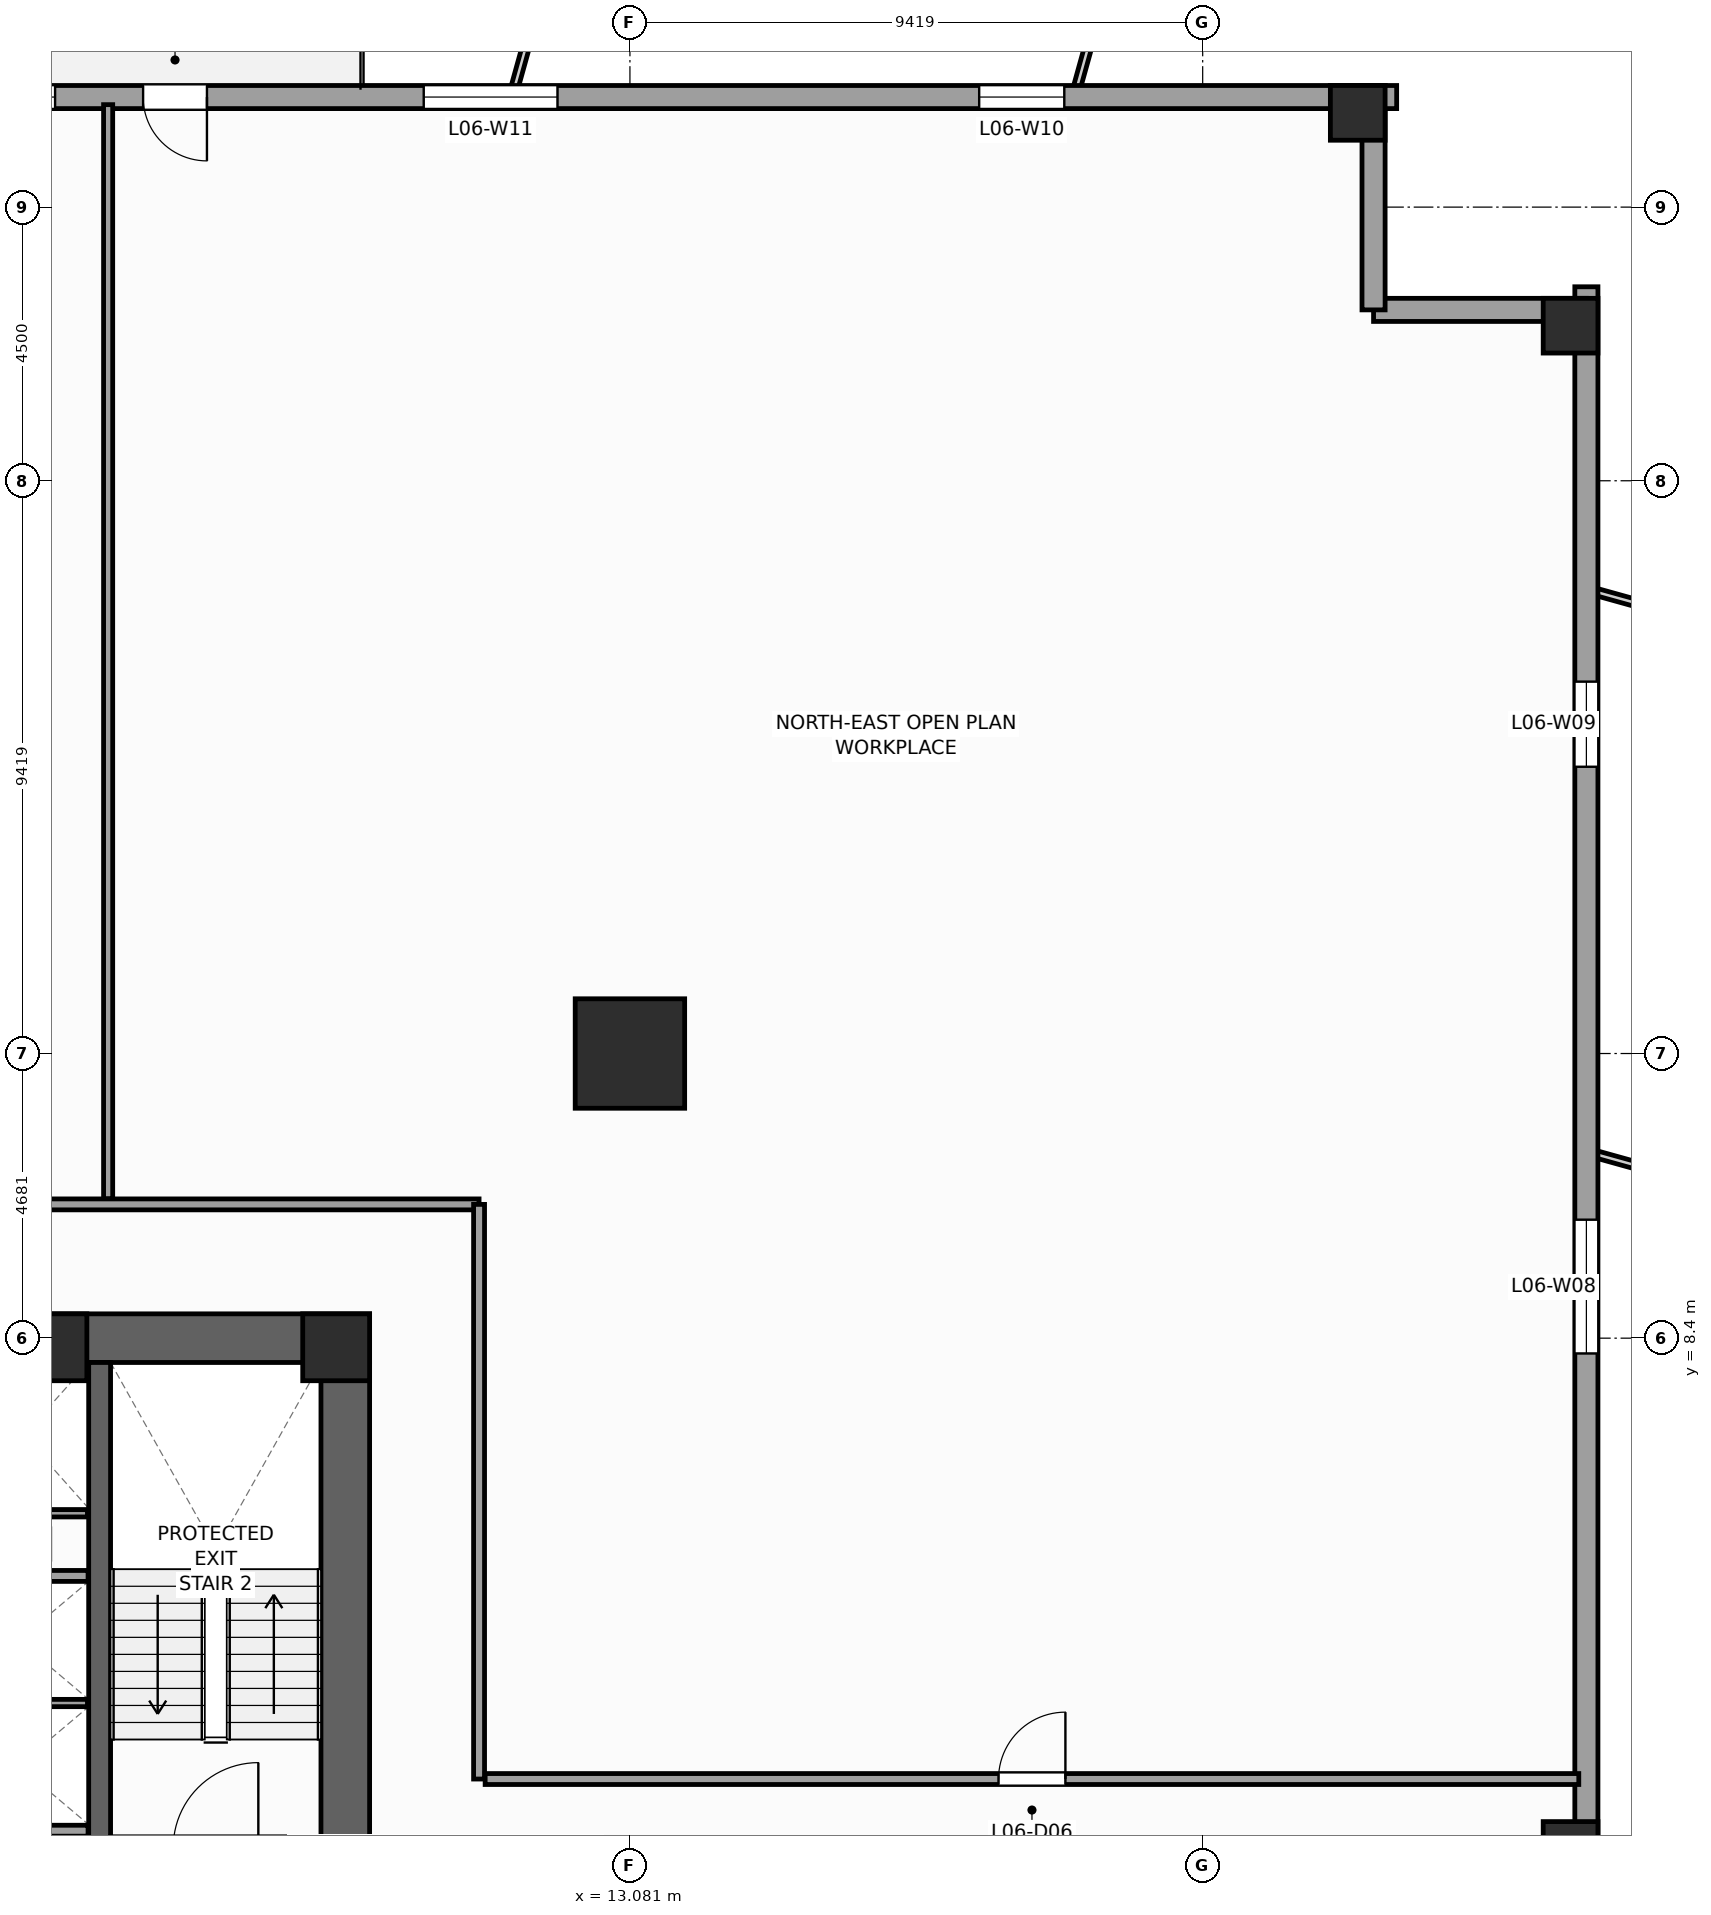
"""IFC4 building model, lengths in metres.
Left out: names, types, materials, properties, quantities, classifications, styles, units other than length and angle.
Written with IfcOpenShell. Run it as: python <this file> out.ifc"""

import sys

from ifc_helpers import new_model, si_unit, direction, frame, frame_2d, origin, origin_2d, place, context, subcontext, project, spatial, rectangle, extrude, source, transform, mapped, element, fill, save


model = new_model("IFC4")
c1 = context("Model", 3, precision=1e-05, world=origin(), true_north=direction((0.0, 1.0)))
c2 = subcontext(c1, "Body", "Model", "MODEL_VIEW")
j1 = project(units=[si_unit("LENGTHUNIT", "METRE"), si_unit("PLANEANGLEUNIT", "RADIAN")], contexts=[c1])
p1 = place(None, origin())
s1 = spatial("IfcSite", under=j1, at=p1, CompositionType="ELEMENT")
p2 = place(p1, origin())
s2 = spatial("IfcBuilding", under=s1, at=p2, CompositionType="ELEMENT")
p3 = place(p2, frame((0.0, 0.0, 30.0)))
s3 = spatial("IfcBuildingStorey", under=s2, at=p3, CompositionType="ELEMENT", Elevation=30.0)
p4 = place(p3, frame((-8.8, 8.4, 0.0), z_axis=(0.0, 0.0, 1.0), x_axis=(1.0, 0.0, 0.0)))
e1 = element("IfcWall", 1, at=p4, inside=s3, PredefinedType="SHEAR", context=c2, shape_type="SweptSolid", body=[
    extrude(rectangle(XDim=17.6, YDim=0.8, at=frame_2d((8.8, 0.0))), origin(), (0.0, 0.0, 1.0), 4.0),
])
p5 = place(p3, frame((8.4, -8.0, 0.0), z_axis=(0.0, 0.0, 1.0), x_axis=(0.0, 1.0, 0.0)))
e2 = element("IfcWall", 2, at=p5, inside=s3, PredefinedType="SHEAR", context=c2, shape_type="SweptSolid", body=[
    extrude(rectangle(XDim=16.0, YDim=0.8, at=frame_2d((8.0, 0.0))), origin(), (0.0, 0.0, 1.0), 4.0),
])
p6 = place(p5, frame((4.69, 0.0, 0.0)))
e3 = element("IfcOpeningElement", 3, at=p6, cuts=e2, PredefinedType="OPENING", context=c2, shape_type="SweptSolid", body=[
    extrude(rectangle(XDim=1.3, YDim=2.2, at=frame_2d((0.65, 1.1))), frame((0.0, 0.41, 0.0), z_axis=(0.0, -1.0, 0.0), x_axis=(1.0, 0.0, 0.0)), (0.0, 0.0, 1.0), 0.82),
])
p7 = place(p3, frame((4.36, -8.0, 0.0), z_axis=(0.0, 0.0, 1.0), x_axis=(0.0, 1.0, 0.0)))
e4 = element("IfcWall", 4, at=p7, inside=s3, PredefinedType="SHEAR", context=c2, shape_type="SweptSolid", body=[
    extrude(rectangle(XDim=16.0, YDim=0.36, at=frame_2d((8.0, 0.0))), origin(), (0.0, 0.0, 1.0), 4.0),
])
m1 = source(origin(), c2, "Body", "SweptSolid", [
    extrude(rectangle(XDim=1.1, YDim=1.1, at=origin_2d()), origin(), (0.0, 0.0, 1.0), 4.0),
])
for number, where, z_axis, x_axis in (
    (5, (8.25, 8.25, 0.0), (0.0, 0.0, 1.0), (1.0, 0.0, 0.0)),
    (6, (3.6, 8.25, 0.0), (0.0, 0.0, 1.0), (1.0, 0.0, 0.0)),
):
    element("IfcColumn", number, at=place(p3, frame(where, z_axis=z_axis, x_axis=x_axis)), inside=s3, PredefinedType="PILASTER", context=c2, shape_type="MappedRepresentation", body=[
        mapped(m1, transform((0.0, 0.0, 0.0), scale=1.0)),
    ])
m2 = source(origin(), c2, "Body", "SweptSolid", [
    extrude(rectangle(XDim=1.8, YDim=1.8, at=origin_2d()), origin(), (0.0, 0.0, 1.0), 4.0),
])
p8 = place(p3, frame((13.081, 13.081, 0.0), z_axis=(0.0, 0.0, 1.0), x_axis=(1.0, 0.0, 0.0)))
e7 = element("IfcColumn", 7, at=p8, inside=s3, PredefinedType="COLUMN", context=c2, shape_type="MappedRepresentation", body=[
    mapped(m2, transform((0.0, 0.0, 0.0), scale=1.0)),
])
m3 = source(origin(), c2, "Body", "SweptSolid", [
    extrude(rectangle(XDim=0.9, YDim=0.9, at=origin_2d()), origin(), (0.0, 0.0, 1.0), 4.0),
])
for number, where, z_axis, x_axis in (
    (8, (28.55, 0.0, 0.0), (0.0, 0.0, 1.0), (1.0, 0.0, 0.0)),
    (9, (28.55, 25.05, 0.0), (0.0, 0.0, 1.0), (1.0, 0.0, 0.0)),
    (10, (25.05, 28.55, 0.0), (0.0, 0.0, 1.0), (1.0, 0.0, 0.0)),
):
    element("IfcColumn", number, at=place(p3, frame(where, z_axis=z_axis, x_axis=x_axis)), inside=s3, PredefinedType="COLUMN", context=c2, shape_type="MappedRepresentation", body=[
        mapped(m3, transform((0.0, 0.0, 0.0), scale=1.0)),
    ])
p9 = place(p3, frame((28.81, -25.69, 0.0), z_axis=(0.0, 0.0, 1.0), x_axis=(0.0, 1.0, 0.0)))
e11 = element("IfcWall", 11, at=p9, inside=s3, PredefinedType="STANDARD", context=c2, shape_type="SweptSolid", body=[
    extrude(rectangle(XDim=51.38, YDim=0.38, at=frame_2d((25.69, 0.0))), origin(), (0.0, 0.0, 1.0), 3.12),
])
p10 = place(p9, frame((5.466, 0.0, 0.49)))
e12 = element("IfcOpeningElement", 12, at=p10, cuts=e11, PredefinedType="OPENING", context=c2, shape_type="SweptSolid", body=[
    extrude(rectangle(XDim=1.4, YDim=2.4, at=frame_2d((0.7, 1.2))), frame((0.0, 0.2, 0.0), z_axis=(0.0, -1.0, 0.0), x_axis=(1.0, 0.0, 0.0)), (0.0, 0.0, 1.0), 0.4),
])
p11 = place(p9, frame((13.8, 0.0, 0.49)))
e13 = element("IfcOpeningElement", 13, at=p11, cuts=e11, PredefinedType="OPENING", context=c2, shape_type="SweptSolid", body=[
    extrude(rectangle(XDim=2.2, YDim=2.4, at=frame_2d((1.1, 1.2))), frame((0.0, 0.2, 0.0), z_axis=(0.0, -1.0, 0.0), x_axis=(1.0, 0.0, 0.0)), (0.0, 0.0, 1.0), 0.4),
])
p12 = place(p9, frame((21.312, 0.0, 0.49)))
e14 = element("IfcOpeningElement", 14, at=p12, cuts=e11, PredefinedType="OPENING", context=c2, shape_type="SweptSolid", body=[
    extrude(rectangle(XDim=2.2, YDim=2.4, at=frame_2d((1.1, 1.2))), frame((0.0, 0.2, 0.0), z_axis=(0.0, -1.0, 0.0), x_axis=(1.0, 0.0, 0.0)), (0.0, 0.0, 1.0), 0.4),
])
p13 = place(p9, frame((33.838, 0.0, 0.49)))
e15 = element("IfcOpeningElement", 15, at=p13, cuts=e11, PredefinedType="OPENING", context=c2, shape_type="SweptSolid", body=[
    extrude(rectangle(XDim=2.2, YDim=2.4, at=frame_2d((1.1, 1.2))), frame((0.0, 0.2, 0.0), z_axis=(0.0, -1.0, 0.0), x_axis=(1.0, 0.0, 0.0)), (0.0, 0.0, 1.0), 0.4),
])
p14 = place(p9, frame((43.487, 0.0, 0.49)))
e16 = element("IfcOpeningElement", 16, at=p14, cuts=e11, PredefinedType="OPENING", context=c2, shape_type="SweptSolid", body=[
    extrude(rectangle(XDim=1.4, YDim=2.4, at=frame_2d((0.7, 1.2))), frame((0.0, 0.2, 0.0), z_axis=(0.0, -1.0, 0.0), x_axis=(1.0, 0.0, 0.0)), (0.0, 0.0, 1.0), 0.4),
])
p15 = place(p3, frame((28.81, 25.31, 0.0), z_axis=(0.0, 0.0, 1.0), x_axis=(-1.0, 0.0, 0.0)))
e17 = element("IfcWall", 17, at=p15, inside=s3, PredefinedType="STANDARD", context=c2, shape_type="SweptSolid", body=[
    extrude(rectangle(XDim=3.5, YDim=0.38, at=frame_2d((1.75, 0.0))), origin(), (0.0, 0.0, 1.0), 3.72),
])
p16 = place(p3, frame((25.31, 25.31, 0.0), z_axis=(0.0, 0.0, 1.0), x_axis=(0.0, 1.0, 0.0)))
e18 = element("IfcWall", 18, at=p16, inside=s3, PredefinedType="STANDARD", context=c2, shape_type="SweptSolid", body=[
    extrude(rectangle(XDim=3.69, YDim=0.38, at=frame_2d((1.845, 0.0))), origin(), (0.0, 0.0, 1.0), 3.72),
])
p17 = place(p3, frame((25.69, 28.81, 0.0), z_axis=(0.0, 0.0, 1.0), x_axis=(-1.0, 0.0, 0.0)))
e19 = element("IfcWall", 19, at=p17, inside=s3, PredefinedType="STANDARD", context=c2, shape_type="SweptSolid", body=[
    extrude(rectangle(XDim=51.38, YDim=0.38, at=frame_2d((25.69, 0.0))), origin(), (0.0, 0.0, 1.0), 3.12),
])
p18 = place(p17, frame((19.565, 0.0, 0.0)))
e20 = element("IfcOpeningElement", 20, at=p18, cuts=e19, PredefinedType="OPENING", context=c2, shape_type="SweptSolid", body=[
    extrude(rectangle(XDim=1.05, YDim=2.25, at=frame_2d((0.525, 1.125))), frame((0.0, 0.2, 0.0), z_axis=(0.0, -1.0, 0.0), x_axis=(1.0, 0.0, 0.0)), (0.0, 0.0, 1.0), 0.4),
])
p19 = place(p17, frame((5.466, 0.0, 0.49)))
e21 = element("IfcOpeningElement", 21, at=p19, cuts=e19, PredefinedType="OPENING", context=c2, shape_type="SweptSolid", body=[
    extrude(rectangle(XDim=1.4, YDim=2.4, at=frame_2d((0.7, 1.2))), frame((0.0, 0.2, 0.0), z_axis=(0.0, -1.0, 0.0), x_axis=(1.0, 0.0, 0.0)), (0.0, 0.0, 1.0), 0.4),
])
p20 = place(p17, frame((13.8, 0.0, 0.49)))
e22 = element("IfcOpeningElement", 22, at=p20, cuts=e19, PredefinedType="OPENING", context=c2, shape_type="SweptSolid", body=[
    extrude(rectangle(XDim=2.2, YDim=2.4, at=frame_2d((1.1, 1.2))), frame((0.0, 0.2, 0.0), z_axis=(0.0, -1.0, 0.0), x_axis=(1.0, 0.0, 0.0)), (0.0, 0.0, 1.0), 0.4),
])
p21 = place(p17, frame((22.062, 0.0, 0.49)))
e23 = element("IfcOpeningElement", 23, at=p21, cuts=e19, PredefinedType="OPENING", context=c2, shape_type="SweptSolid", body=[
    extrude(rectangle(XDim=2.2, YDim=2.4, at=frame_2d((1.1, 1.2))), frame((0.0, 0.2, 0.0), z_axis=(0.0, -1.0, 0.0), x_axis=(1.0, 0.0, 0.0)), (0.0, 0.0, 1.0), 0.4),
])
p22 = place(p17, frame((33.838, 0.0, 0.49)))
e24 = element("IfcOpeningElement", 24, at=p22, cuts=e19, PredefinedType="OPENING", context=c2, shape_type="SweptSolid", body=[
    extrude(rectangle(XDim=2.2, YDim=2.4, at=frame_2d((1.1, 1.2))), frame((0.0, 0.2, 0.0), z_axis=(0.0, -1.0, 0.0), x_axis=(1.0, 0.0, 0.0)), (0.0, 0.0, 1.0), 0.4),
])
p23 = place(p17, frame((43.487, 0.0, 0.49)))
e25 = element("IfcOpeningElement", 25, at=p23, cuts=e19, PredefinedType="OPENING", context=c2, shape_type="SweptSolid", body=[
    extrude(rectangle(XDim=1.4, YDim=2.4, at=frame_2d((0.7, 1.2))), frame((0.0, 0.2, 0.0), z_axis=(0.0, -1.0, 0.0), x_axis=(1.0, 0.0, 0.0)), (0.0, 0.0, 1.0), 0.4),
])
for number, where, z_axis, x_axis in (
    (26, (1.89, 0.3, 0.0), (0.0, 0.0, 1.0), (1.0, 0.0, 0.0)),
    (27, (1.89, 4.49, 0.0), (0.0, 0.0, 1.0), (1.0, 0.0, 0.0)),
):
    element("IfcWall", number, at=place(p3, frame(where, z_axis=z_axis, x_axis=x_axis)), inside=s3, PredefinedType="PARTITIONING", context=c2, shape_type="SweptSolid", body=[
        extrude(rectangle(XDim=2.28, YDim=0.18, at=frame_2d((1.14, 0.0))), origin(), (0.0, 0.0, 1.0), 3.72),
    ])
p24 = place(p3, frame((1.9, 2.4, 0.0), z_axis=(0.0, 0.0, 1.0), x_axis=(1.0, 0.0, 0.0)))
e28 = element("IfcWall", 28, at=p24, inside=s3, PredefinedType="PARTITIONING", context=c2, shape_type="SweptSolid", body=[
    extrude(rectangle(XDim=2.26, YDim=0.12, at=frame_2d((1.13, 0.0))), origin(), (0.0, 0.0, 1.0), 3.72),
])
p25 = place(p3, frame((2.06, 5.52, 0.0), z_axis=(0.0, 0.0, 1.0), x_axis=(1.0, 0.0, 0.0)))
e29 = element("IfcWall", 29, at=p25, inside=s3, PredefinedType="PARTITIONING", context=c2, shape_type="SweptSolid", body=[
    extrude(rectangle(XDim=2.1, YDim=0.12, at=frame_2d((1.05, 0.0))), origin(), (0.0, 0.0, 1.0), 3.72),
])
p26 = place(p3, frame((-10.6, 10.6, 0.0), z_axis=(0.0, 0.0, 1.0), x_axis=(1.0, 0.0, 0.0)))
e30 = element("IfcWall", 30, at=p26, inside=s3, PredefinedType="PARTITIONING", context=c2, shape_type="SweptSolid", body=[
    extrude(rectangle(XDim=21.2, YDim=0.18, at=frame_2d((10.6, 0.0))), origin(), (0.0, 0.0, 1.0), 3.72),
])
p27 = place(p26, frame((10.05, 0.0, 0.0)))
e31 = element("IfcOpeningElement", 31, at=p27, cuts=e30, PredefinedType="OPENING", context=c2, shape_type="SweptSolid", body=[
    extrude(rectangle(XDim=1.1, YDim=2.2, at=frame_2d((0.55, 1.1))), frame((0.0, 0.1, 0.0), z_axis=(0.0, -1.0, 0.0), x_axis=(1.0, 0.0, 0.0)), (0.0, 0.0, 1.0), 0.2),
])
p28 = place(p3, frame((10.6, 1.15, 0.0), z_axis=(0.0, 0.0, 1.0), x_axis=(0.0, 1.0, 0.0)))
e32 = element("IfcWall", 32, at=p28, inside=s3, PredefinedType="PARTITIONING", context=c2, shape_type="SweptSolid", body=[
    extrude(rectangle(XDim=9.45, YDim=0.18, at=frame_2d((4.725, 0.0))), origin(), (0.0, 0.0, 1.0), 3.72),
])
p29 = place(p3, frame((10.7, 1.15, 0.0), z_axis=(0.0, 0.0, 1.0), x_axis=(1.0, 0.0, 0.0)))
e33 = element("IfcWall", 33, at=p29, inside=s3, PredefinedType="PARTITIONING", context=c2, shape_type="SweptSolid", body=[
    extrude(rectangle(XDim=17.985, YDim=0.18, at=frame_2d((8.993, 0.0))), origin(), (0.0, 0.0, 1.0), 3.72),
])
p30 = place(p29, frame((8.442, 0.0, 0.0)))
e34 = element("IfcOpeningElement", 34, at=p30, cuts=e33, PredefinedType="OPENING", context=c2, shape_type="SweptSolid", body=[
    extrude(rectangle(XDim=1.1, YDim=2.2, at=frame_2d((0.55, 1.1))), frame((0.0, 0.1, 0.0), z_axis=(0.0, -1.0, 0.0), x_axis=(1.0, 0.0, 0.0)), (0.0, 0.0, 1.0), 0.2),
])
p31 = place(p3, frame((4.5, 10.695, 0.0), z_axis=(0.0, 0.0, 1.0), x_axis=(0.0, 1.0, 0.0)))
e35 = element("IfcWall", 35, at=p31, inside=s3, PredefinedType="PARTITIONING", context=c2, shape_type="SweptSolid", body=[
    extrude(rectangle(XDim=17.99, YDim=0.15, at=frame_2d((8.995, 0.0))), origin(), (0.0, 0.0, 1.0), 3.72),
])
m4 = source(origin(), c2, "Body", "SweptSolid", [
    extrude(rectangle(XDim=2.2, YDim=2.4, at=frame_2d((1.1, 1.2))), frame((0.0, 0.03, 0.0), z_axis=(0.0, -1.0, 0.0), x_axis=(1.0, 0.0, 0.0)), (0.0, 0.0, 1.0), 0.06),
])
p32 = place(p13, origin())
e36 = element("IfcWindow", 36, at=p32, inside=s3, PartitioningType="SINGLE_PANEL", PredefinedType="WINDOW", context=c2, shape_type="MappedRepresentation", body=[
    mapped(m4, transform((0.0, 0.0, 0.0), scale=1.0)),
])
fill(e15, e36)
m5 = source(origin(), c2, "Body", "SweptSolid", [
    extrude(rectangle(XDim=1.4, YDim=2.4, at=frame_2d((0.7, 1.2))), frame((0.0, 0.03, 0.0), z_axis=(0.0, -1.0, 0.0), x_axis=(1.0, 0.0, 0.0)), (0.0, 0.0, 1.0), 0.06),
])
p33 = place(p14, origin())
e37 = element("IfcWindow", 37, at=p33, inside=s3, PartitioningType="SINGLE_PANEL", PredefinedType="WINDOW", context=c2, shape_type="MappedRepresentation", body=[
    mapped(m5, transform((0.0, 0.0, 0.0), scale=1.0)),
])
fill(e16, e37)
m6 = source(origin(), c2, "Body", "SweptSolid", [
    extrude(rectangle(XDim=1.05, YDim=2.25, at=frame_2d((0.525, 1.125))), frame((0.0, 0.025, 0.0), z_axis=(0.0, -1.0, 0.0), x_axis=(1.0, 0.0, 0.0)), (0.0, 0.0, 1.0), 0.05),
])
p34 = place(p18, origin())
e38 = element("IfcDoor", 38, at=p34, inside=s3, OperationType="SINGLE_SWING_LEFT", PredefinedType="DOOR", context=c2, shape_type="MappedRepresentation", body=[
    mapped(m6, transform((0.0, 0.0, 0.0), scale=1.0)),
])
fill(e20, e38)
p35 = place(p19, origin())
e39 = element("IfcWindow", 39, at=p35, inside=s3, PartitioningType="SINGLE_PANEL", PredefinedType="WINDOW", context=c2, shape_type="MappedRepresentation", body=[
    mapped(m5, transform((0.0, 0.0, 0.0), scale=1.0)),
])
fill(e21, e39)
p36 = place(p20, origin())
e40 = element("IfcWindow", 40, at=p36, inside=s3, PartitioningType="SINGLE_PANEL", PredefinedType="WINDOW", context=c2, shape_type="MappedRepresentation", body=[
    mapped(m4, transform((0.0, 0.0, 0.0), scale=1.0)),
])
fill(e22, e40)
p37 = place(p21, origin())
e41 = element("IfcWindow", 41, at=p37, inside=s3, PartitioningType="SINGLE_PANEL", PredefinedType="WINDOW", context=c2, shape_type="MappedRepresentation", body=[
    mapped(m4, transform((0.0, 0.0, 0.0), scale=1.0)),
])
fill(e23, e41)
m7 = source(origin(), c2, "Body", "SweptSolid", [
    extrude(rectangle(XDim=1.1, YDim=2.2, at=frame_2d((0.55, 1.1))), frame((0.0, 0.025, 0.0), z_axis=(0.0, -1.0, 0.0), x_axis=(1.0, 0.0, 0.0)), (0.0, 0.0, 1.0), 0.05),
])
p38 = place(p30, origin())
e42 = element("IfcDoor", 42, at=p38, inside=s3, OperationType="SINGLE_SWING_RIGHT", PredefinedType="DOOR", context=c2, shape_type="MappedRepresentation", body=[
    mapped(m7, transform((0.0, 0.0, 0.0), scale=1.0)),
])
fill(e34, e42)
save(model, sys.argv[1])
